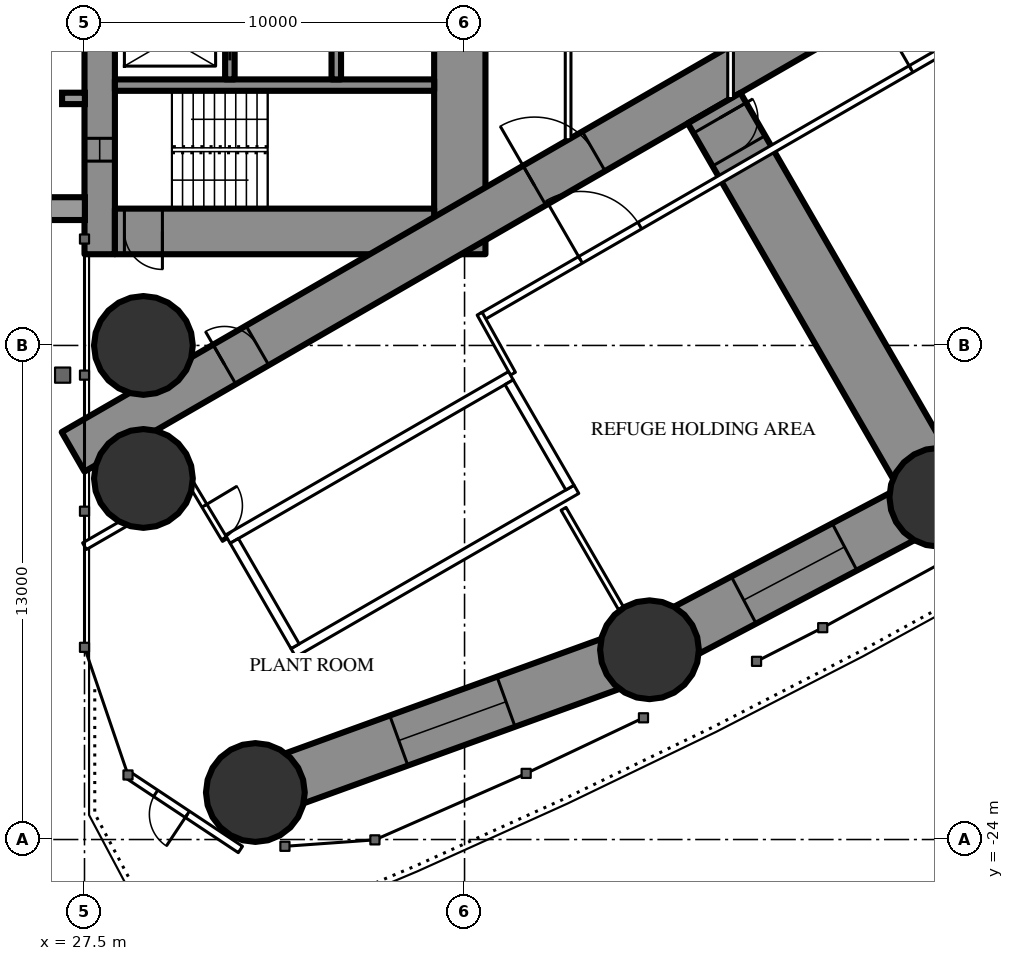
"""IFC4 building model, lengths in metres.
Left out: names, types, materials, properties, quantities, classifications, styles, units other than length and angle.
Written with IfcOpenShell. Run it as: python <this file> out.ifc"""

import sys

from ifc_helpers import new_model, si_unit, direction, frame, frame_2d, origin, origin_2d, place, context, subcontext, project, spatial, rectangle, hollow_circle, extrude, element, fill, save


model = new_model("IFC4")
c1 = context("Model", 3, precision=1e-05, world=origin(), true_north=direction((0.0, 1.0)))
c2 = subcontext(c1, "Body", "Model", "MODEL_VIEW")
j1 = project(units=[si_unit("LENGTHUNIT", "METRE"), si_unit("PLANEANGLEUNIT", "RADIAN")], contexts=[c1])
p1 = place(None, origin())
s1 = spatial("IfcSite", under=j1, at=p1, CompositionType="ELEMENT")
p2 = place(p1, origin())
s2 = spatial("IfcBuilding", under=s1, at=p2, CompositionType="ELEMENT")
p3 = place(p2, frame((0.0, 0.0, 87.0)))
s3 = spatial("IfcBuildingStorey", under=s2, at=p3, CompositionType="ELEMENT", Elevation=87.0)
for number, where, z_axis, x_axis in (
    (1, (31.996, -22.763, 0.0), (0.0, 0.0, 1.0), (1.0, 0.0, 0.0)),
    (2, (29.05, -11.0, 0.0), (0.0, 0.0, 1.0), (1.0, 0.0, 0.0)),
    (3, (29.05, -14.5, 0.0), (0.0, 0.0, 1.0), (1.0, 0.0, 0.0)),
    (4, (42.366, -19.007, 0.0), (0.0, 0.0, 1.0), (1.0, 0.0, 0.0)),
    (5, (49.979, -14.994, 0.0), (0.0, 0.0, 1.0), (1.0, 0.0, 0.0)),
):
    element("IfcColumn", number, at=place(p3, frame(where, z_axis=z_axis, x_axis=x_axis)), inside=s3, PredefinedType="COLUMN", context=c2, shape_type="SweptSolid", body=[
        extrude(hollow_circle(Radius=1.3, WallThickness=0.1, at=origin_2d()), origin(), (0.0, 0.0, 1.0), 3.6),
    ])
p4 = place(p3, frame((27.9, -8.6, 0.0), z_axis=(0.0, 0.0, 1.0), x_axis=(0.0, 1.0, 0.0)))
e6 = element("IfcWall", 6, at=p4, inside=s3, PredefinedType="SHEAR", context=c2, shape_type="SweptSolid", body=[
    extrude(rectangle(XDim=17.2, YDim=0.8, at=frame_2d((8.6, 0.0))), origin(), (0.0, 0.0, 1.0), 3.6),
])
p5 = place(p4, frame((2.45, 0.0, 0.6)))
e7 = element("IfcOpeningElement", 7, at=p5, cuts=e6, PredefinedType="OPENING", context=c2, shape_type="SweptSolid", body=[
    extrude(rectangle(XDim=0.6, YDim=2.1, at=frame_2d((0.3, 1.05))), frame((0.0, 0.41, 0.0), z_axis=(0.0, -1.0, 0.0), x_axis=(1.0, 0.0, 0.0)), (0.0, 0.0, 1.0), 0.82),
])
p6 = place(p4, frame((14.15, 0.0, 0.6)))
e8 = element("IfcOpeningElement", 8, at=p6, cuts=e6, PredefinedType="OPENING", context=c2, shape_type="SweptSolid", body=[
    extrude(rectangle(XDim=0.6, YDim=2.1, at=frame_2d((0.3, 1.05))), frame((0.0, 0.41, 0.0), z_axis=(0.0, -1.0, 0.0), x_axis=(1.0, 0.0, 0.0)), (0.0, 0.0, 1.0), 0.82),
])
p7 = place(p3, frame((37.375, -8.6, 0.0), z_axis=(0.0, 0.0, 1.0), x_axis=(0.0, 1.0, 0.0)))
e9 = element("IfcWall", 9, at=p7, inside=s3, PredefinedType="SHEAR", context=c2, shape_type="SweptSolid", body=[
    extrude(rectangle(XDim=17.2, YDim=1.35, at=frame_2d((8.6, 0.0))), origin(), (0.0, 0.0, 1.0), 3.6),
])
p8 = place(p7, frame((7.7, 0.0, 0.0)))
e10 = element("IfcOpeningElement", 10, at=p8, cuts=e9, PredefinedType="OPENING", context=c2, shape_type="SweptSolid", body=[
    extrude(rectangle(XDim=1.8, YDim=2.2, at=frame_2d((0.9, 1.1))), frame((0.0, 0.685, 0.0), z_axis=(0.0, -1.0, 0.0), x_axis=(1.0, 0.0, 0.0)), (0.0, 0.0, 1.0), 1.37),
])
p9 = place(p3, frame((28.3, -8.0, 0.0), z_axis=(0.0, 0.0, 1.0), x_axis=(1.0, 0.0, 0.0)))
e11 = element("IfcWall", 11, at=p9, inside=s3, PredefinedType="SHEAR", context=c2, shape_type="SweptSolid", body=[
    extrude(rectangle(XDim=8.4, YDim=1.2, at=frame_2d((4.2, 0.0))), origin(), (0.0, 0.0, 1.0), 3.6),
])
p10 = place(p9, frame((0.25, 0.0, 0.0)))
e12 = element("IfcOpeningElement", 12, at=p10, cuts=e11, PredefinedType="OPENING", context=c2, shape_type="SweptSolid", body=[
    extrude(rectangle(XDim=1.0, YDim=2.2, at=frame_2d((0.5, 1.1))), frame((0.0, 0.61, 0.0), z_axis=(0.0, -1.0, 0.0), x_axis=(1.0, 0.0, 0.0)), (0.0, 0.0, 1.0), 1.22),
])
p11 = place(p3, frame((28.3, -4.15, 0.0), z_axis=(0.0, 0.0, 1.0), x_axis=(1.0, 0.0, 0.0)))
e13 = element("IfcWall", 13, at=p11, inside=s3, PredefinedType="SHEAR", context=c2, shape_type="SweptSolid", body=[
    extrude(rectangle(XDim=8.4, YDim=0.3, at=frame_2d((4.2, 0.0))), origin(), (0.0, 0.0, 1.0), 3.6),
])
p12 = place(p3, frame((31.325, -4.0, 0.0), z_axis=(0.0, 0.0, 1.0), x_axis=(0.0, 1.0, 0.0)))
e14 = element("IfcWall", 14, at=p12, inside=s3, PredefinedType="SHEAR", context=c2, shape_type="SweptSolid", body=[
    extrude(rectangle(XDim=2.1, YDim=0.25, at=frame_2d((1.05, 0.0))), origin(), (0.0, 0.0, 1.0), 3.6),
])
p13 = place(p12, frame((0.5, 0.0, 0.0)))
e15 = element("IfcOpeningElement", 15, at=p13, cuts=e14, PredefinedType="OPENING", context=c2, shape_type="SweptSolid", body=[
    extrude(rectangle(XDim=1.1, YDim=2.2, at=frame_2d((0.55, 1.1))), frame((0.0, 0.135, 0.0), z_axis=(0.0, -1.0, 0.0), x_axis=(1.0, 0.0, 0.0)), (0.0, 0.0, 1.0), 0.27),
])
p14 = place(p3, frame((34.125, -4.0, 0.0), z_axis=(0.0, 0.0, 1.0), x_axis=(0.0, 1.0, 0.0)))
e16 = element("IfcWall", 16, at=p14, inside=s3, PredefinedType="SHEAR", context=c2, shape_type="SweptSolid", body=[
    extrude(rectangle(XDim=2.35, YDim=0.25, at=frame_2d((1.175, 0.0))), origin(), (0.0, 0.0, 1.0), 3.6),
])
p15 = place(p3, frame((27.2, -13.8, 0.0), z_axis=(0.0, 0.0, 1.0), x_axis=(0.866027159892, 0.499996958321, 0.0)))
e17 = element("IfcWall", 17, at=p15, inside=s3, PredefinedType="SHEAR", context=c2, shape_type="SweptSolid", body=[
    extrude(rectangle(XDim=27.947, YDim=1.2, at=frame_2d((13.973, 0.0))), origin(), (0.0, 0.0, 1.0), 3.6),
])
p16 = place(p15, frame((4.6, 0.0, 0.0)))
e18 = element("IfcOpeningElement", 18, at=p16, cuts=e17, PredefinedType="OPENING", context=c2, shape_type="SweptSolid", body=[
    extrude(rectangle(XDim=1.0, YDim=2.2, at=frame_2d((0.5, 1.1))), frame((0.0, 0.61, 0.0), z_axis=(0.0, -1.0, 0.0), x_axis=(1.0, 0.0, 0.0)), (0.0, 0.0, 1.0), 1.22),
])
p17 = place(p15, frame((14.018, 0.0, 0.0)))
e19 = element("IfcOpeningElement", 19, at=p17, cuts=e17, PredefinedType="OPENING", context=c2, shape_type="SweptSolid", body=[
    extrude(rectangle(XDim=1.8, YDim=2.2, at=frame_2d((0.9, 1.1))), frame((0.0, 0.61, 0.0), z_axis=(0.0, -1.0, 0.0), x_axis=(1.0, 0.0, 0.0)), (0.0, 0.0, 1.0), 1.22),
])
p18 = place(p3, frame((44.067, -4.754, 0.0), z_axis=(0.0, 0.0, 1.0), x_axis=(0.499987574995, -0.866032577246, 0.0)))
e20 = element("IfcWall", 20, at=p18, inside=s3, PredefinedType="SHEAR", context=c2, shape_type="SweptSolid", body=[
    extrude(rectangle(XDim=11.824, YDim=1.6, at=frame_2d((5.912, 0.0))), origin(), (0.0, 0.0, 1.0), 3.6),
])
p19 = place(p18, frame((0.3, 0.0, 0.0)))
e21 = element("IfcOpeningElement", 21, at=p19, cuts=e20, PredefinedType="OPENING", context=c2, shape_type="SweptSolid", body=[
    extrude(rectangle(XDim=1.0, YDim=2.2, at=frame_2d((0.5, 1.1))), frame((0.0, 0.81, 0.0), z_axis=(0.0, -1.0, 0.0), x_axis=(1.0, 0.0, 0.0)), (0.0, 0.0, 1.0), 1.62),
])
p20 = place(p3, frame((31.996, -22.763, 0.0), z_axis=(0.0, 0.0, 1.0), x_axis=(0.940225039526, 0.340553777029, 0.0)))
e22 = element("IfcWall", 22, at=p20, inside=s3, PredefinedType="SHEAR", context=c2, shape_type="SweptSolid", body=[
    extrude(rectangle(XDim=11.029, YDim=1.4, at=frame_2d((5.515, 0.0))), origin(), (0.0, 0.0, 1.0), 3.6),
])
p21 = place(p20, frame((4.015, 0.0, 0.6)))
e23 = element("IfcOpeningElement", 23, at=p21, cuts=e22, PredefinedType="OPENING", context=c2, shape_type="SweptSolid", body=[
    extrude(rectangle(XDim=3.0, YDim=1.2, at=frame_2d((1.5, 0.6))), frame((0.0, 0.71, 0.0), z_axis=(0.0, -1.0, 0.0), x_axis=(1.0, 0.0, 0.0)), (0.0, 0.0, 1.0), 1.42),
])
p22 = place(p3, frame((42.366, -19.007, 0.0), z_axis=(0.0, 0.0, 1.0), x_axis=(0.884632510133, 0.466288882578, 0.0)))
e24 = element("IfcWall", 24, at=p22, inside=s3, PredefinedType="SHEAR", context=c2, shape_type="SweptSolid", body=[
    extrude(rectangle(XDim=8.606, YDim=1.4, at=frame_2d((4.303, 0.0))), origin(), (0.0, 0.0, 1.0), 3.6),
])
p23 = place(p22, frame((2.803, 0.0, 0.6)))
e25 = element("IfcOpeningElement", 25, at=p23, cuts=e24, PredefinedType="OPENING", context=c2, shape_type="SweptSolid", body=[
    extrude(rectangle(XDim=3.0, YDim=1.2, at=frame_2d((1.5, 0.6))), frame((0.0, 0.71, 0.0), z_axis=(0.0, -1.0, 0.0), x_axis=(1.0, 0.0, 0.0)), (0.0, 0.0, 1.0), 1.42),
])
p24 = place(p3, frame((49.979, -14.994, 0.0), z_axis=(0.0, 0.0, 1.0), x_axis=(0.849312372751, 0.527890607505, 0.0)))
e26 = element("IfcWall", 26, at=p24, inside=s3, PredefinedType="SHEAR", context=c2, shape_type="SweptSolid", body=[
    extrude(rectangle(XDim=12.906, YDim=1.4, at=frame_2d((6.453, 0.0))), origin(), (0.0, 0.0, 1.0), 3.6),
])
p25 = place(p24, frame((4.953, 0.0, 0.6)))
e27 = element("IfcOpeningElement", 27, at=p25, cuts=e26, PredefinedType="OPENING", context=c2, shape_type="SweptSolid", body=[
    extrude(rectangle(XDim=3.0, YDim=1.2, at=frame_2d((1.5, 0.6))), frame((0.0, 0.71, 0.0), z_axis=(0.0, -1.0, 0.0), x_axis=(1.0, 0.0, 0.0)), (0.0, 0.0, 1.0), 1.42),
])
p26 = place(p3, frame((31.602, -24.262, 0.0), z_axis=(0.0, 0.0, 1.0), x_axis=(-0.833476513596, 0.552554885314, 0.0)))
e28 = element("IfcWall", 28, at=p26, inside=s3, PredefinedType="STANDARD", context=c2, shape_type="SweptSolid", body=[
    extrude(rectangle(XDim=3.548, YDim=0.2, at=frame_2d((1.774, 0.0))), origin(), (0.0, 0.0, 1.0), 3.35),
])
p27 = place(p26, frame((1.674, 0.0, 0.0)))
e29 = element("IfcOpeningElement", 29, at=p27, cuts=e28, PredefinedType="OPENING", context=c2, shape_type="SweptSolid", body=[
    extrude(rectangle(XDim=1.0, YDim=2.2, at=frame_2d((0.5, 1.1))), frame((0.0, 0.11, 0.0), z_axis=(0.0, -1.0, 0.0), x_axis=(1.0, 0.0, 0.0)), (0.0, 0.0, 1.0), 0.22),
])
p28 = place(p3, frame((40.105, -15.299, 0.0), z_axis=(0.0, 0.0, 1.0), x_axis=(0.499978822259, -0.866037630414, 0.0)))
e30 = element("IfcWall", 30, at=p28, inside=s3, PredefinedType="PARTITIONING", context=c2, shape_type="SweptSolid", body=[
    extrude(rectangle(XDim=3.023, YDim=0.15, at=frame_2d((1.511, 0.0))), origin(), (0.0, 0.0, 1.0), 3.35),
])
p29 = place(p3, frame((27.5, -16.282, 0.0), z_axis=(0.0, 0.0, 1.0), x_axis=(0.866039938485, 0.499974824316, 0.0)))
e31 = element("IfcWall", 31, at=p29, inside=s3, PredefinedType="PARTITIONING", context=c2, shape_type="SweptSolid", body=[
    extrude(rectangle(XDim=3.238, YDim=0.2, at=frame_2d((1.619, 0.0))), origin(), (0.0, 0.0, 1.0), 3.35),
])
p30 = place(p3, frame((37.96, -10.243, 0.0), z_axis=(0.0, 0.0, 1.0), x_axis=(0.866026429433, 0.499998223521, 0.0)))
e32 = element("IfcWall", 32, at=p30, inside=s3, PredefinedType="PARTITIONING", context=c2, shape_type="SweptSolid", body=[
    extrude(rectangle(XDim=20.487, YDim=0.2, at=frame_2d((10.243, 0.0))), origin(), (0.0, 0.0, 1.0), 3.35),
])
p31 = place(p30, frame((13.034, 0.0, 0.0)))
e33 = element("IfcOpeningElement", 33, at=p31, cuts=e32, PredefinedType="OPENING", context=c2, shape_type="SweptSolid", body=[
    extrude(rectangle(XDim=1.8, YDim=2.2, at=frame_2d((0.9, 1.1))), frame((0.0, 0.11, 0.0), z_axis=(0.0, -1.0, 0.0), x_axis=(1.0, 0.0, 0.0)), (0.0, 0.0, 1.0), 0.22),
])
p32 = place(p30, frame((2.992, 0.0, 0.0)))
e34 = element("IfcOpeningElement", 34, at=p32, cuts=e32, PredefinedType="OPENING", context=c2, shape_type="SweptSolid", body=[
    extrude(rectangle(XDim=1.8, YDim=2.2, at=frame_2d((0.9, 1.1))), frame((0.0, 0.11, 0.0), z_axis=(0.0, -1.0, 0.0), x_axis=(1.0, 0.0, 0.0)), (0.0, 0.0, 1.0), 0.22),
])
p33 = place(p3, frame((30.267, -14.569, 0.0), z_axis=(0.0, 0.0, 1.0), x_axis=(0.514336634837, -0.857588377991, 0.0)))
e35 = element("IfcWall", 35, at=p33, inside=s3, PredefinedType="PARTITIONING", context=c2, shape_type="SweptSolid", body=[
    extrude(rectangle(XDim=1.805, YDim=0.15, at=frame_2d((0.903, 0.0))), origin(), (0.0, 0.0, 1.0), 3.35),
])
p34 = place(p33, frame((0.755, 0.0, 0.0)))
e36 = element("IfcOpeningElement", 36, at=p34, cuts=e35, PredefinedType="OPENING", context=c2, shape_type="SweptSolid", body=[
    extrude(rectangle(XDim=1.0, YDim=2.03, at=frame_2d((0.5, 1.015))), frame((0.0, 0.085, 0.0), z_axis=(0.0, -1.0, 0.0), x_axis=(1.0, 0.0, 0.0)), (0.0, 0.0, 1.0), 0.17),
])
p35 = place(p3, frame((38.773, -11.742, 0.0), z_axis=(0.0, 0.0, 1.0), x_axis=(-0.485528096672, 0.8742210632, 0.0)))
e37 = element("IfcWall", 37, at=p35, inside=s3, PredefinedType="PARTITIONING", context=c2, shape_type="SweptSolid", body=[
    extrude(rectangle(XDim=1.805, YDim=0.15, at=frame_2d((0.903, 0.0))), origin(), (0.0, 0.0, 1.0), 3.35),
])
p36 = place(p3, frame((40.225, -5.587, 0.0), z_axis=(0.0, 0.0, 1.0), x_axis=(0.0, 1.0, 0.0)))
e38 = element("IfcWall", 38, at=p36, inside=s3, PredefinedType="PARTITIONING", context=c2, shape_type="SweptSolid", body=[
    extrude(rectangle(XDim=11.174, YDim=0.15, at=frame_2d((5.587, 0.0))), origin(), (0.0, 0.0, 1.0), 3.35),
])
p37 = place(p36, frame((4.687, 0.0, 0.0)))
e39 = element("IfcOpeningElement", 39, at=p37, cuts=e38, PredefinedType="OPENING", context=c2, shape_type="SweptSolid", body=[
    extrude(rectangle(XDim=1.8, YDim=2.2, at=frame_2d((0.9, 1.1))), frame((0.0, 0.085, 0.0), z_axis=(0.0, -1.0, 0.0), x_axis=(1.0, 0.0, 0.0)), (0.0, 0.0, 1.0), 0.17),
])
p38 = place(p3, frame((44.5, -4.505, 0.0), z_axis=(0.0, 0.0, 1.0), x_axis=(0.0, 1.0, 0.0)))
e40 = element("IfcWall", 40, at=p38, inside=s3, PredefinedType="PARTITIONING", context=c2, shape_type="SweptSolid", body=[
    extrude(rectangle(XDim=7.986, YDim=0.15, at=frame_2d((3.993, 0.0))), origin(), (0.0, 0.0, 1.0), 3.35),
])
p39 = place(p38, frame((4.005, 0.0, 0.0)))
e41 = element("IfcOpeningElement", 41, at=p39, cuts=e40, PredefinedType="OPENING", context=c2, shape_type="SweptSolid", body=[
    extrude(rectangle(XDim=1.0, YDim=2.2, at=frame_2d((0.5, 1.1))), frame((0.0, 0.085, 0.0), z_axis=(0.0, -1.0, 0.0), x_axis=(1.0, 0.0, 0.0)), (0.0, 0.0, 1.0), 0.17),
])
for number, where, z_axis, x_axis in (
    (42, (31.271, -16.097, 0.0), (0.0, 0.0, 1.0), (0.866, 0.5, 0.0)),
    (43, (32.996, -19.086, 0.0), (0.0, 0.0, 1.0), (0.866, 0.5, 0.0)),
):
    element("IfcWall", number, at=place(p3, frame(where, z_axis=z_axis, x_axis=x_axis)), inside=s3, PredefinedType="PARTITIONING", context=c2, shape_type="SweptSolid", body=[
        extrude(rectangle(XDim=8.6, YDim=0.25, at=frame_2d((4.3, 0.0))), origin(), (0.0, 0.0, 1.0), 3.35),
    ])
for number, where, z_axis, x_axis in (
    (44, (31.441, -16.143, 0.0), (0.0, 0.0, 1.0), (0.5, -0.866, 0.0)),
    (45, (38.673, -11.968, 0.0), (0.0, 0.0, 1.0), (0.5, -0.866, 0.0)),
):
    element("IfcWall", number, at=place(p3, frame(where, z_axis=z_axis, x_axis=x_axis)), inside=s3, PredefinedType="PARTITIONING", context=c2, shape_type="SweptSolid", body=[
        extrude(rectangle(XDim=3.201, YDim=0.25, at=frame_2d((1.6, 0.0))), origin(), (0.0, 0.0, 1.0), 3.35),
    ])
p40 = place(p21, origin())
e46 = element("IfcWindow", 46, at=p40, inside=s3, PartitioningType="SINGLE_PANEL", PredefinedType="WINDOW", context=c2, shape_type="SweptSolid", body=[
    extrude(rectangle(XDim=3.0, YDim=1.2, at=frame_2d((1.5, 0.6))), frame((0.0, 0.03, 0.0), z_axis=(0.0, -1.0, 0.0), x_axis=(1.0, 0.0, 0.0)), (0.0, 0.0, 1.0), 0.06),
])
fill(e23, e46)
p41 = place(p23, origin())
e47 = element("IfcWindow", 47, at=p41, inside=s3, PartitioningType="SINGLE_PANEL", PredefinedType="WINDOW", context=c2, shape_type="SweptSolid", body=[
    extrude(rectangle(XDim=3.0, YDim=1.2, at=frame_2d((1.5, 0.6))), frame((0.0, 0.03, 0.0), z_axis=(0.0, -1.0, 0.0), x_axis=(1.0, 0.0, 0.0)), (0.0, 0.0, 1.0), 0.06),
])
fill(e25, e47)
p42 = place(p27, origin())
e48 = element("IfcDoor", 48, at=p42, inside=s3, OperationType="SINGLE_SWING_LEFT", PredefinedType="DOOR", context=c2, shape_type="SweptSolid", body=[
    extrude(rectangle(XDim=1.0, YDim=2.2, at=frame_2d((0.5, 1.1))), frame((0.0, 0.025, 0.0), z_axis=(0.0, -1.0, 0.0), x_axis=(1.0, 0.0, 0.0)), (0.0, 0.0, 1.0), 0.05),
])
fill(e29, e48)
p43 = place(p19, origin())
e49 = element("IfcDoor", 49, at=p43, inside=s3, OperationType="SINGLE_SWING_LEFT", PredefinedType="DOOR", context=c2, shape_type="SweptSolid", body=[
    extrude(rectangle(XDim=1.0, YDim=2.2, at=frame_2d((0.5, 1.1))), frame((0.0, 0.025, 0.0), z_axis=(0.0, -1.0, 0.0), x_axis=(1.0, 0.0, 0.0)), (0.0, 0.0, 1.0), 0.05),
])
fill(e21, e49)
p44 = place(p31, origin())
e50 = element("IfcDoor", 50, at=p44, inside=s3, OperationType="DOUBLE_DOOR_SINGLE_SWING", PredefinedType="DOOR", context=c2, shape_type="SweptSolid", body=[
    extrude(rectangle(XDim=1.8, YDim=2.2, at=frame_2d((0.9, 1.1))), frame((0.0, 0.025, 0.0), z_axis=(0.0, -1.0, 0.0), x_axis=(1.0, 0.0, 0.0)), (0.0, 0.0, 1.0), 0.05),
])
fill(e33, e50)
p45 = place(p34, origin())
e51 = element("IfcDoor", 51, at=p45, inside=s3, OperationType="SINGLE_SWING_LEFT", PredefinedType="DOOR", context=c2, shape_type="SweptSolid", body=[
    extrude(rectangle(XDim=1.0, YDim=2.03, at=frame_2d((0.5, 1.015))), frame((0.0, 0.025, 0.0), z_axis=(0.0, -1.0, 0.0), x_axis=(1.0, 0.0, 0.0)), (0.0, 0.0, 1.0), 0.05),
])
fill(e36, e51)
p46 = place(p32, origin())
e52 = element("IfcDoor", 52, at=p46, inside=s3, OperationType="DOUBLE_DOOR_SINGLE_SWING", PredefinedType="DOOR", context=c2, shape_type="SweptSolid", body=[
    extrude(rectangle(XDim=1.8, YDim=2.2, at=frame_2d((0.9, 1.1))), frame((0.0, 0.025, 0.0), z_axis=(0.0, -1.0, 0.0), x_axis=(1.0, 0.0, 0.0)), (0.0, 0.0, 1.0), 0.05),
])
fill(e34, e52)
p47 = place(p16, origin())
e53 = element("IfcDoor", 53, at=p47, inside=s3, OperationType="SINGLE_SWING_LEFT", PredefinedType="DOOR", context=c2, shape_type="SweptSolid", body=[
    extrude(rectangle(XDim=1.0, YDim=2.2, at=frame_2d((0.5, 1.1))), frame((0.0, 0.025, 0.0), z_axis=(0.0, -1.0, 0.0), x_axis=(1.0, 0.0, 0.0)), (0.0, 0.0, 1.0), 0.05),
])
fill(e18, e53)
p48 = place(p17, origin())
e54 = element("IfcDoor", 54, at=p48, inside=s3, OperationType="DOUBLE_DOOR_SINGLE_SWING", PredefinedType="DOOR", context=c2, shape_type="SweptSolid", body=[
    extrude(rectangle(XDim=1.8, YDim=2.2, at=frame_2d((0.9, 1.1))), frame((0.0, 0.025, 0.0), z_axis=(0.0, -1.0, 0.0), x_axis=(1.0, 0.0, 0.0)), (0.0, 0.0, 1.0), 0.05),
])
fill(e19, e54)
p49 = place(p10, origin())
e55 = element("IfcDoor", 55, at=p49, inside=s3, OperationType="SINGLE_SWING_RIGHT", PredefinedType="DOOR", context=c2, shape_type="SweptSolid", body=[
    extrude(rectangle(XDim=1.0, YDim=2.2, at=frame_2d((0.5, 1.1))), frame((0.0, 0.025, 0.0), z_axis=(0.0, -1.0, 0.0), x_axis=(1.0, 0.0, 0.0)), (0.0, 0.0, 1.0), 0.05),
])
fill(e12, e55)
p50 = place(p13, origin())
e56 = element("IfcDoor", 56, at=p50, inside=s3, OperationType="SLIDING_TO_LEFT", PredefinedType="USERDEFINED", context=c2, shape_type="SweptSolid", body=[
    extrude(rectangle(XDim=1.1, YDim=2.2, at=frame_2d((0.55, 1.1))), frame((0.0, 0.025, 0.0), z_axis=(0.0, -1.0, 0.0), x_axis=(1.0, 0.0, 0.0)), (0.0, 0.0, 1.0), 0.05),
])
fill(e15, e56)
p51 = place(p5, origin())
e57 = element("IfcWindow", 57, at=p51, inside=s3, PartitioningType="SINGLE_PANEL", PredefinedType="WINDOW", context=c2, shape_type="SweptSolid", body=[
    extrude(rectangle(XDim=0.6, YDim=2.1, at=frame_2d((0.3, 1.05))), frame((0.0, 0.03, 0.0), z_axis=(0.0, -1.0, 0.0), x_axis=(1.0, 0.0, 0.0)), (0.0, 0.0, 1.0), 0.06),
])
fill(e7, e57)
save(model, sys.argv[1])
